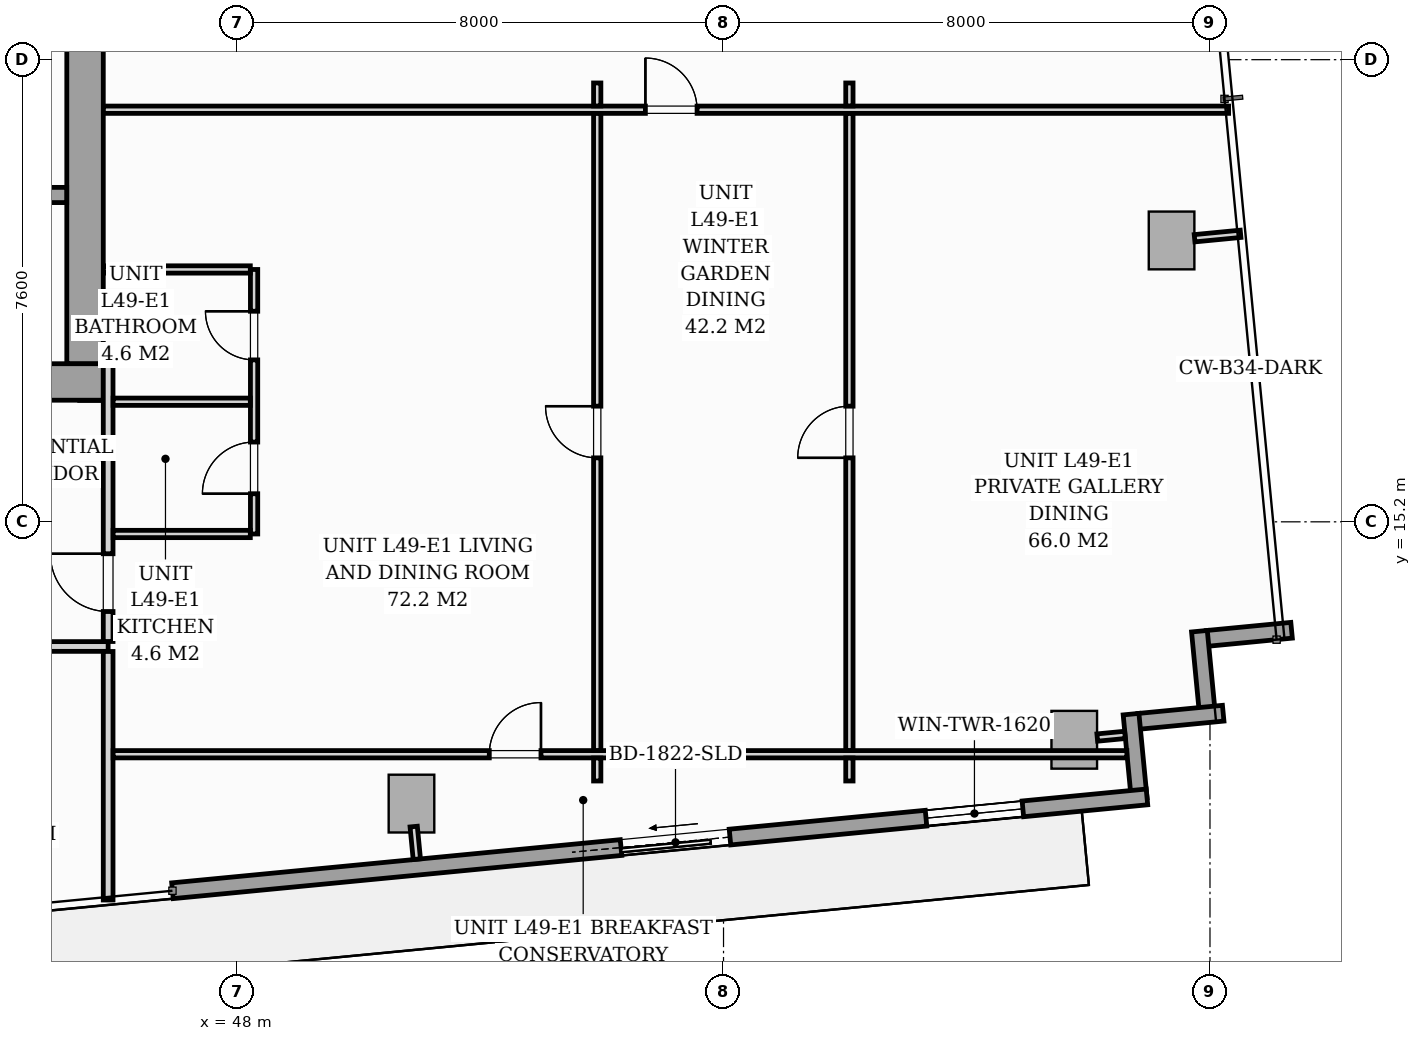
"""IFC4 building model, lengths in metres.
Left out: names, types, materials, properties, quantities, classifications, styles, units other than length and angle.
Written with IfcOpenShell. Run it as: python <this file> out.ifc"""

import sys

from ifc_helpers import new_model, si_unit, direction, frame, frame_2d, origin, origin_2d, place, context, subcontext, project, spatial, rectangle, i_section, extrude, source, transform, mapped, element, fill, save


model = new_model("IFC4")
c1 = context("Model", 3, precision=1e-05, world=origin(), true_north=direction((0.0, 1.0)))
c2 = subcontext(c1, "Body", "Model", "MODEL_VIEW")
j1 = project(units=[si_unit("LENGTHUNIT", "METRE"), si_unit("PLANEANGLEUNIT", "RADIAN")], contexts=[c1])
p1 = place(None, origin())
s1 = spatial("IfcSite", under=j1, at=p1, CompositionType="ELEMENT")
p2 = place(p1, origin())
s2 = spatial("IfcBuilding", under=s1, at=p2, CompositionType="ELEMENT")
p3 = place(p2, frame((0.0, 0.0, 173.0)))
s3 = spatial("IfcBuildingStorey", under=s2, at=p3, CompositionType="ELEMENT", Elevation=173.0)
m1 = source(origin(), c2, "Body", "SweptSolid", [
    extrude(i_section(OverallWidth=0.416, OverallDepth=0.446, WebThickness=0.039, FlangeThickness=0.063, FilletRadius=0.018, at=origin_2d()), origin(), (0.0, 0.0, 1.0), 3.196),
])
p4 = place(p3, frame((45.6, 17.4, 0.002), z_axis=(0.0, 0.0, 1.0), x_axis=(1.0, 0.0, 0.0)))
e1 = element("IfcColumn", 1, at=p4, inside=s3, PredefinedType="PILASTER", context=c2, shape_type="MappedRepresentation", body=[
    mapped(m1, transform((0.0, 0.0, 0.0), scale=1.0)),
])
m2 = source(origin(), c2, "Body", "SweptSolid", [
    extrude(rectangle(XDim=0.75, YDim=0.95, at=origin_2d()), origin(), (0.0, 0.0, 1.0), 3.196),
])
for number, where, z_axis, x_axis in (
    (2, (50.868, 10.566, 0.002), (0.0, 0.0, 1.0), (0.995, 0.096, 0.0)),
    (3, (61.768, 11.616, 0.002), (0.0, 0.0, 1.0), (0.995, 0.096, 0.0)),
    (4, (63.368, 19.827, 0.002), (0.0, 0.0, 1.0), (0.995, 0.096, 0.0)),
):
    element("IfcColumn", number, at=place(p3, frame(where, z_axis=z_axis, x_axis=x_axis)), inside=s3, PredefinedType="COLUMN", context=c2, shape_type="MappedRepresentation", body=[
        mapped(m2, transform((0.0, 0.0, 0.0), scale=1.0)),
    ])
p5 = place(p3, frame((65.342, 13.417, 0.0), z_axis=(0.0, 0.0, 1.0), x_axis=(-0.99540774648, -0.095725744959, 0.0)))
e5 = element("IfcWall", 5, at=p5, inside=s3, PredefinedType="STANDARD", context=c2, shape_type="SweptSolid", body=[
    extrude(rectangle(XDim=1.395, YDim=0.26, at=frame_2d((0.698, 0.0))), origin(), (0.0, 0.0, 1.0), 2.94),
])
p6 = place(p3, frame((63.826, 13.401, 0.0), z_axis=(0.0, 0.0, 1.0), x_axis=(0.095915846097, -0.995389446633, 0.0)))
e6 = element("IfcWall", 6, at=p6, inside=s3, PredefinedType="STANDARD", context=c2, shape_type="SweptSolid", body=[
    extrude(rectangle(XDim=1.395, YDim=0.26, at=frame_2d((0.697, 0.0))), origin(), (0.0, 0.0, 1.0), 2.94),
])
for number, where, z_axis, x_axis in (
    (7, (64.217, 12.053, 0.0), (0.0, 0.0, 1.0), (-0.995, -0.096, 0.0)),
    (8, (62.702, 12.037, 0.0), (0.0, 0.0, 1.0), (0.096, -0.995, 0.0)),
):
    element("IfcWall", number, at=place(p3, frame(where, z_axis=z_axis, x_axis=x_axis)), inside=s3, PredefinedType="STANDARD", context=c2, shape_type="SweptSolid", body=[
        extrude(rectangle(XDim=1.395, YDim=0.26, at=frame_2d((0.698, 0.0))), origin(), (0.0, 0.0, 1.0), 2.94),
    ])
p7 = place(p3, frame((62.963, 10.676, 0.0), z_axis=(0.0, 0.0, 1.0), x_axis=(-0.995395627913, -0.095851676732, 0.0)))
e9 = element("IfcWall", 9, at=p7, inside=s3, PredefinedType="STANDARD", context=c2, shape_type="SweptSolid", body=[
    extrude(rectangle(XDim=16.1, YDim=0.26, at=frame_2d((8.05, 0.0))), origin(), (0.0, 0.0, 1.0), 2.94),
])
p8 = place(p7, frame((6.889, 0.0, 0.0)))
e10 = element("IfcOpeningElement", 10, at=p8, cuts=e9, PredefinedType="OPENING", context=c2, shape_type="SweptSolid", body=[
    extrude(rectangle(XDim=1.8, YDim=2.06, at=frame_2d((0.9, 1.03))), frame((0.0, 0.14, 0.0), z_axis=(0.0, -1.0, 0.0), x_axis=(1.0, 0.0, 0.0)), (0.0, 0.0, 1.0), 0.28),
])
p9 = place(p7, frame((2.05, 0.0, 0.65)))
e11 = element("IfcOpeningElement", 11, at=p9, cuts=e9, PredefinedType="OPENING", context=c2, shape_type="SweptSolid", body=[
    extrude(rectangle(XDim=1.6, YDim=1.5, at=frame_2d((0.8, 0.75))), frame((0.0, 0.14, 0.0), z_axis=(0.0, -1.0, 0.0), x_axis=(1.0, 0.0, 0.0)), (0.0, 0.0, 1.0), 0.28),
])
p10 = place(p3, frame((26.2, 17.5, 0.0), z_axis=(0.0, 0.0, 1.0), x_axis=(1.0, 0.0, 0.0)))
e12 = element("IfcWall", 12, at=p10, inside=s3, PredefinedType="SHEAR", context=c2, shape_type="SweptSolid", body=[
    extrude(rectangle(XDim=19.6, YDim=0.6, at=frame_2d((9.8, 0.0))), origin(), (0.0, 0.0, 1.0), 3.2),
])
p11 = place(p10, frame((0.95, 0.0, 0.0)))
e13 = element("IfcOpeningElement", 13, at=p11, cuts=e12, PredefinedType="OPENING", context=c2, shape_type="SweptSolid", body=[
    extrude(rectangle(XDim=0.95, YDim=2.06, at=frame_2d((0.475, 1.03))), frame((0.0, 0.31, 0.0), z_axis=(0.0, -1.0, 0.0), x_axis=(1.0, 0.0, 0.0)), (0.0, 0.0, 1.0), 0.62),
])
p12 = place(p10, frame((9.38, 0.0, 0.0)))
e14 = element("IfcOpeningElement", 14, at=p12, cuts=e12, PredefinedType="OPENING", context=c2, shape_type="SweptSolid", body=[
    extrude(rectangle(XDim=0.85, YDim=2.0, at=frame_2d((0.425, 1.0))), frame((0.0, 0.31, 0.0), z_axis=(0.0, -1.0, 0.0), x_axis=(1.0, 0.0, 0.0)), (0.0, 0.0, 1.0), 0.62),
])
p13 = place(p10, frame((17.55, 0.0, 0.0)))
e15 = element("IfcOpeningElement", 15, at=p13, cuts=e12, PredefinedType="OPENING", context=c2, shape_type="SweptSolid", body=[
    extrude(rectangle(XDim=0.95, YDim=2.06, at=frame_2d((0.475, 1.03))), frame((0.0, 0.31, 0.0), z_axis=(0.0, -1.0, 0.0), x_axis=(1.0, 0.0, 0.0)), (0.0, 0.0, 1.0), 0.62),
])
p14 = place(p3, frame((45.5, 17.802, 0.0), z_axis=(0.0, 0.0, 1.0), x_axis=(0.0, 1.0, 0.0)))
e16 = element("IfcWall", 16, at=p14, inside=s3, PredefinedType="SHEAR", context=c2, shape_type="SweptSolid", body=[
    extrude(rectangle(XDim=5.796, YDim=0.6, at=frame_2d((2.898, 0.0))), origin(), (0.0, 0.0, 1.0), 3.2),
])
p15 = place(p3, frame((37.05, 20.575, 0.0), z_axis=(0.0, 0.0, 1.0), x_axis=(1.0, 0.0, 0.0)))
e17 = element("IfcWall", 17, at=p15, inside=s3, PredefinedType="SOLIDWALL", context=c2, shape_type="SweptSolid", body=[
    extrude(rectangle(XDim=8.148, YDim=0.25, at=frame_2d((4.074, 0.0))), origin(), (0.0, 0.0, 1.0), 3.2),
])
p16 = place(p15, frame((6.6, 0.0, 0.0)))
e18 = element("IfcOpeningElement", 18, at=p16, cuts=e17, PredefinedType="OPENING", context=c2, shape_type="SweptSolid", body=[
    extrude(rectangle(XDim=0.95, YDim=2.06, at=frame_2d((0.475, 1.03))), frame((0.0, 0.135, 0.0), z_axis=(0.0, -1.0, 0.0), x_axis=(1.0, 0.0, 0.0)), (0.0, 0.0, 1.0), 0.27),
])
p17 = place(p3, frame((22.6, 13.15, 0.0), z_axis=(0.0, 0.0, 1.0), x_axis=(1.0, 0.0, 0.0)))
e19 = element("IfcWall", 19, at=p17, inside=s3, PredefinedType="PARTITIONING", context=c2, shape_type="SweptSolid", body=[
    extrude(rectangle(XDim=23.28, YDim=0.16, at=frame_2d((11.64, 0.0))), origin(), (0.0, 0.0, 1.0), 2.94),
])
p18 = place(p17, frame((0.607, 0.0, 0.0)))
e20 = element("IfcOpeningElement", 20, at=p18, cuts=e19, PredefinedType="OPENING", context=c2, shape_type="SweptSolid", body=[
    extrude(rectangle(XDim=0.95, YDim=2.06, at=frame_2d((0.475, 1.03))), frame((0.0, 0.09, 0.0), z_axis=(0.0, -1.0, 0.0), x_axis=(1.0, 0.0, 0.0)), (0.0, 0.0, 1.0), 0.18),
])
p19 = place(p17, frame((11.717, 0.0, 0.0)))
e21 = element("IfcOpeningElement", 21, at=p19, cuts=e19, PredefinedType="OPENING", context=c2, shape_type="SweptSolid", body=[
    extrude(rectangle(XDim=0.95, YDim=2.06, at=frame_2d((0.475, 1.03))), frame((0.0, 0.09, 0.0), z_axis=(0.0, -1.0, 0.0), x_axis=(1.0, 0.0, 0.0)), (0.0, 0.0, 1.0), 0.18),
])
p20 = place(p3, frame((45.88, 8.981, 0.0), z_axis=(0.0, 0.0, 1.0), x_axis=(0.0, 1.0, 0.0)))
e22 = element("IfcWall", 22, at=p20, inside=s3, PredefinedType="PARTITIONING", context=c2, shape_type="SweptSolid", body=[
    extrude(rectangle(XDim=4.087, YDim=0.16, at=frame_2d((2.043, 0.0))), origin(), (0.0, 0.0, 1.0), 2.94),
])
p21 = place(p3, frame((45.88, 13.232, 0.0), z_axis=(0.0, 0.0, 1.0), x_axis=(0.0, 1.0, 0.0)))
e23 = element("IfcWall", 23, at=p21, inside=s3, PredefinedType="PARTITIONING", context=c2, shape_type="SweptSolid", body=[
    extrude(rectangle(XDim=4.57, YDim=0.16, at=frame_2d((2.285, 0.0))), origin(), (0.0, 0.0, 1.0), 2.94),
])
p22 = place(p21, frame((0.493, 0.0, 0.0)))
e24 = element("IfcOpeningElement", 24, at=p22, cuts=e23, PredefinedType="OPENING", context=c2, shape_type="SweptSolid", body=[
    extrude(rectangle(XDim=0.95, YDim=2.06, at=frame_2d((0.475, 1.03))), frame((0.0, 0.09, 0.0), z_axis=(0.0, -1.0, 0.0), x_axis=(1.0, 0.0, 0.0)), (0.0, 0.0, 1.0), 0.18),
])
p23 = place(p3, frame((48.28, 15.0, 0.0), z_axis=(0.0, 0.0, 1.0), x_axis=(0.0, 1.0, 0.0)))
e25 = element("IfcWall", 25, at=p23, inside=s3, PredefinedType="PARTITIONING", context=c2, shape_type="SweptSolid", body=[
    extrude(rectangle(XDim=4.35, YDim=0.12, at=frame_2d((2.175, 0.0))), origin(), (0.0, 0.0, 1.0), 2.94),
])
p24 = place(p23, frame((0.662, 0.0, 0.0)))
e26 = element("IfcOpeningElement", 26, at=p24, cuts=e25, PredefinedType="OPENING", context=c2, shape_type="SweptSolid", body=[
    extrude(rectangle(XDim=0.85, YDim=2.05, at=frame_2d((0.425, 1.025))), frame((0.0, 0.07, 0.0), z_axis=(0.0, -1.0, 0.0), x_axis=(1.0, 0.0, 0.0)), (0.0, 0.0, 1.0), 0.14),
])
p25 = place(p23, frame((2.863, 0.0, 0.0)))
e27 = element("IfcOpeningElement", 27, at=p25, cuts=e25, PredefinedType="OPENING", context=c2, shape_type="SweptSolid", body=[
    extrude(rectangle(XDim=0.8, YDim=2.02, at=frame_2d((0.4, 1.01))), frame((0.0, 0.07, 0.0), z_axis=(0.0, -1.0, 0.0), x_axis=(1.0, 0.0, 0.0)), (0.0, 0.0, 1.0), 0.14),
])
for number, where, z_axis, x_axis in (
    (28, (45.962, 17.175, 0.0), (0.0, 0.0, 1.0), (1.0, 0.0, 0.0)),
    (29, (45.962, 15.0, 0.0), (0.0, 0.0, 1.0), (1.0, 0.0, 0.0)),
):
    element("IfcWall", number, at=place(p3, frame(where, z_axis=z_axis, x_axis=x_axis)), inside=s3, PredefinedType="PARTITIONING", context=c2, shape_type="SweptSolid", body=[
        extrude(rectangle(XDim=2.256, YDim=0.12, at=frame_2d((1.128, 0.0))), origin(), (0.0, 0.0, 1.0), 2.94),
    ])
p26 = place(p3, frame((45.802, 19.35, 0.0), z_axis=(0.0, 0.0, 1.0), x_axis=(1.0, 0.0, 0.0)))
e30 = element("IfcWall", 30, at=p26, inside=s3, PredefinedType="PARTITIONING", context=c2, shape_type="SweptSolid", body=[
    extrude(rectangle(XDim=2.416, YDim=0.12, at=frame_2d((1.208, 0.0))), origin(), (0.0, 0.0, 1.0), 2.94),
])
p27 = place(p3, frame((45.802, 21.977, 0.0), z_axis=(0.0, 0.0, 1.0), x_axis=(1.0, 0.0, 0.0)))
e31 = element("IfcWall", 31, at=p27, inside=s3, PredefinedType="PARTITIONING", context=c2, shape_type="SweptSolid", body=[
    extrude(rectangle(XDim=18.504, YDim=0.12, at=frame_2d((9.252, 0.0))), origin(), (0.0, 0.0, 1.0), 2.94),
])
p28 = place(p27, frame((8.913, 0.0, 0.0)))
e32 = element("IfcOpeningElement", 32, at=p28, cuts=e31, PredefinedType="OPENING", context=c2, shape_type="SweptSolid", body=[
    extrude(rectangle(XDim=0.85, YDim=2.05, at=frame_2d((0.425, 1.025))), frame((0.0, 0.07, 0.0), z_axis=(0.0, -1.0, 0.0), x_axis=(1.0, 0.0, 0.0)), (0.0, 0.0, 1.0), 0.14),
])
p29 = place(p3, frame((45.962, 11.378, 0.0), z_axis=(0.0, 0.0, 1.0), x_axis=(1.0, 0.0, 0.0)))
e33 = element("IfcWall", 33, at=p29, inside=s3, PredefinedType="PARTITIONING", context=c2, shape_type="SweptSolid", body=[
    extrude(rectangle(XDim=16.671, YDim=0.12, at=frame_2d((8.335, 0.0))), origin(), (0.0, 0.0, 1.0), 2.383),
])
p30 = place(p29, frame((6.186, 0.0, 0.0)))
e34 = element("IfcOpeningElement", 34, at=p30, cuts=e33, PredefinedType="OPENING", context=c2, shape_type="SweptSolid", body=[
    extrude(rectangle(XDim=0.85, YDim=2.05, at=frame_2d((0.425, 1.025))), frame((0.0, 0.07, 0.0), z_axis=(0.0, -1.0, 0.0), x_axis=(1.0, 0.0, 0.0)), (0.0, 0.0, 1.0), 0.14),
])
p31 = place(p3, frame((58.07, 10.938, 0.0), z_axis=(0.0, 0.0, 1.0), x_axis=(0.0, 1.0, 0.0)))
e35 = element("IfcWall", 35, at=p31, inside=s3, PredefinedType="PARTITIONING", context=c2, shape_type="SweptSolid", body=[
    extrude(rectangle(XDim=0.378, YDim=0.12, at=frame_2d((0.189, 0.0))), origin(), (0.0, 0.0, 1.0), 2.94),
])
p32 = place(p3, frame((58.07, 11.44, 0.0), z_axis=(0.0, 0.0, 1.0), x_axis=(0.0, 1.0, 0.0)))
e36 = element("IfcWall", 36, at=p32, inside=s3, PredefinedType="PARTITIONING", context=c2, shape_type="SweptSolid", body=[
    extrude(rectangle(XDim=10.475, YDim=0.12, at=frame_2d((5.238, 0.0))), origin(), (0.0, 0.0, 1.0), 2.94),
])
p33 = place(p32, frame((4.812, 0.0, 0.0)))
e37 = element("IfcOpeningElement", 37, at=p33, cuts=e36, PredefinedType="OPENING", context=c2, shape_type="SweptSolid", body=[
    extrude(rectangle(XDim=0.85, YDim=2.05, at=frame_2d((0.425, 1.025))), frame((0.0, 0.07, 0.0), z_axis=(0.0, -1.0, 0.0), x_axis=(1.0, 0.0, 0.0)), (0.0, 0.0, 1.0), 0.14),
])
for number, where, z_axis, x_axis in (
    (38, (58.07, 22.039, 0.0), (0.0, 0.0, 1.0), (0.0, 1.0, 0.0)),
    (39, (53.923, 10.938, 0.0), (0.0, 0.0, 1.0), (0.0, 1.0, 0.0)),
):
    element("IfcWall", number, at=place(p3, frame(where, z_axis=z_axis, x_axis=x_axis)), inside=s3, PredefinedType="PARTITIONING", context=c2, shape_type="SweptSolid", body=[
        extrude(rectangle(XDim=0.378, YDim=0.12, at=frame_2d((0.189, 0.0))), origin(), (0.0, 0.0, 1.0), 2.94),
    ])
p34 = place(p3, frame((53.923, 11.44, 0.0), z_axis=(0.0, 0.0, 1.0), x_axis=(0.0, 1.0, 0.0)))
e40 = element("IfcWall", 40, at=p34, inside=s3, PredefinedType="PARTITIONING", context=c2, shape_type="SweptSolid", body=[
    extrude(rectangle(XDim=10.475, YDim=0.12, at=frame_2d((5.238, 0.0))), origin(), (0.0, 0.0, 1.0), 2.94),
])
p35 = place(p34, frame((4.812, 0.0, 0.0)))
e41 = element("IfcOpeningElement", 41, at=p35, cuts=e40, PredefinedType="OPENING", context=c2, shape_type="SweptSolid", body=[
    extrude(rectangle(XDim=0.85, YDim=2.05, at=frame_2d((0.425, 1.025))), frame((0.0, 0.07, 0.0), z_axis=(0.0, -1.0, 0.0), x_axis=(1.0, 0.0, 0.0)), (0.0, 0.0, 1.0), 0.14),
])
p36 = place(p3, frame((53.923, 22.039, 0.0), z_axis=(0.0, 0.0, 1.0), x_axis=(0.0, 1.0, 0.0)))
e42 = element("IfcWall", 42, at=p36, inside=s3, PredefinedType="PARTITIONING", context=c2, shape_type="SweptSolid", body=[
    extrude(rectangle(XDim=0.378, YDim=0.12, at=frame_2d((0.189, 0.0))), origin(), (0.0, 0.0, 1.0), 2.94),
])
p37 = place(p3, frame((50.905, 10.188, 0.0), z_axis=(0.0, 0.0, 1.0), x_axis=(0.095772948675, -0.995403205893, 0.0)))
e43 = element("IfcWall", 43, at=p37, inside=s3, PredefinedType="PARTITIONING", context=c2, shape_type="SweptSolid", body=[
    extrude(rectangle(XDim=0.538, YDim=0.12, at=frame_2d((0.269, 0.0))), origin(), (0.0, 0.0, 1.0), 2.94),
])
p38 = place(p3, frame((62.146, 11.652, 0.0), z_axis=(0.0, 0.0, 1.0), x_axis=(0.995384576284, 0.09596637586, 0.0)))
e44 = element("IfcWall", 44, at=p38, inside=s3, PredefinedType="PARTITIONING", context=c2, shape_type="SweptSolid", body=[
    extrude(rectangle(XDim=0.458, YDim=0.12, at=frame_2d((0.229, 0.0))), origin(), (0.0, 0.0, 1.0), 2.94),
])
p39 = place(p3, frame((63.747, 19.864, 0.0), z_axis=(0.0, 0.0, 1.0), x_axis=(0.995405496295, 0.095749140702, 0.0)))
e45 = element("IfcWall", 45, at=p39, inside=s3, PredefinedType="PARTITIONING", context=c2, shape_type="SweptSolid", body=[
    extrude(rectangle(XDim=0.76, YDim=0.12, at=frame_2d((0.38, 0.0))), origin(), (0.0, 0.0, 1.0), 2.94),
])
m3 = source(origin(), c2, "Body", "SweptSolid", [
    extrude(rectangle(XDim=1.8, YDim=2.06, at=frame_2d((0.9, 1.03))), frame((0.0, 0.025, 0.0), z_axis=(0.0, -1.0, 0.0), x_axis=(1.0, 0.0, 0.0)), (0.0, 0.0, 1.0), 0.05),
])
p40 = place(p8, origin())
e46 = element("IfcDoor", 46, at=p40, inside=s3, OperationType="SLIDING_TO_RIGHT", PredefinedType="DOOR", context=c2, shape_type="MappedRepresentation", body=[
    mapped(m3, transform((0.0, 0.0, 0.0), scale=1.0)),
])
fill(e10, e46)
m4 = source(origin(), c2, "Body", "SweptSolid", [
    extrude(rectangle(XDim=1.6, YDim=1.5, at=frame_2d((0.8, 0.75))), frame((0.0, 0.03, 0.0), z_axis=(0.0, -1.0, 0.0), x_axis=(1.0, 0.0, 0.0)), (0.0, 0.0, 1.0), 0.06),
])
p41 = place(p9, origin())
e47 = element("IfcWindow", 47, at=p41, inside=s3, PartitioningType="SINGLE_PANEL", PredefinedType="WINDOW", context=c2, shape_type="MappedRepresentation", body=[
    mapped(m4, transform((0.0, 0.0, 0.0), scale=1.0)),
])
fill(e11, e47)
m5 = source(origin(), c2, "Body", "SweptSolid", [
    extrude(rectangle(XDim=0.95, YDim=2.06, at=frame_2d((0.475, 1.03))), frame((0.0, 0.025, 0.0), z_axis=(0.0, -1.0, 0.0), x_axis=(1.0, 0.0, 0.0)), (0.0, 0.0, 1.0), 0.05),
])
p42 = place(p22, origin())
e48 = element("IfcDoor", 48, at=p42, inside=s3, OperationType="SINGLE_SWING_RIGHT", PredefinedType="DOOR", context=c2, shape_type="MappedRepresentation", body=[
    mapped(m5, transform((0.0, 0.0, 0.0), scale=1.0)),
])
fill(e24, e48)
m6 = source(origin(), c2, "Body", "SweptSolid", [
    extrude(rectangle(XDim=0.85, YDim=2.05, at=frame_2d((0.425, 1.025))), frame((0.0, 0.025, 0.0), z_axis=(0.0, -1.0, 0.0), x_axis=(1.0, 0.0, 0.0)), (0.0, 0.0, 1.0), 0.05),
])
p43 = place(p24, origin())
e49 = element("IfcDoor", 49, at=p43, inside=s3, OperationType="SINGLE_SWING_LEFT", PredefinedType="DOOR", context=c2, shape_type="MappedRepresentation", body=[
    mapped(m6, transform((0.0, 0.0, 0.0), scale=1.0)),
])
fill(e26, e49)
m7 = source(origin(), c2, "Body", "SweptSolid", [
    extrude(rectangle(XDim=0.8, YDim=2.02, at=frame_2d((0.4, 1.01))), frame((0.0, 0.025, 0.0), z_axis=(0.0, -1.0, 0.0), x_axis=(1.0, 0.0, 0.0)), (0.0, 0.0, 1.0), 0.05),
])
p44 = place(p25, origin())
e50 = element("IfcDoor", 50, at=p44, inside=s3, OperationType="SINGLE_SWING_RIGHT", PredefinedType="DOOR", context=c2, shape_type="MappedRepresentation", body=[
    mapped(m7, transform((0.0, 0.0, 0.0), scale=1.0)),
])
fill(e27, e50)
p45 = place(p28, origin())
e51 = element("IfcDoor", 51, at=p45, inside=s3, OperationType="SINGLE_SWING_LEFT", PredefinedType="DOOR", context=c2, shape_type="MappedRepresentation", body=[
    mapped(m6, transform((0.0, 0.0, 0.0), scale=1.0)),
])
fill(e32, e51)
p46 = place(p30, origin())
e52 = element("IfcDoor", 52, at=p46, inside=s3, OperationType="SINGLE_SWING_RIGHT", PredefinedType="DOOR", context=c2, shape_type="MappedRepresentation", body=[
    mapped(m6, transform((0.0, 0.0, 0.0), scale=1.0)),
])
fill(e34, e52)
p47 = place(p33, origin())
e53 = element("IfcDoor", 53, at=p47, inside=s3, OperationType="SINGLE_SWING_LEFT", PredefinedType="DOOR", context=c2, shape_type="MappedRepresentation", body=[
    mapped(m6, transform((0.0, 0.0, 0.0), scale=1.0)),
])
fill(e37, e53)
p48 = place(p35, origin())
e54 = element("IfcDoor", 54, at=p48, inside=s3, OperationType="SINGLE_SWING_RIGHT", PredefinedType="DOOR", context=c2, shape_type="MappedRepresentation", body=[
    mapped(m6, transform((0.0, 0.0, 0.0), scale=1.0)),
])
fill(e41, e54)
save(model, sys.argv[1])
